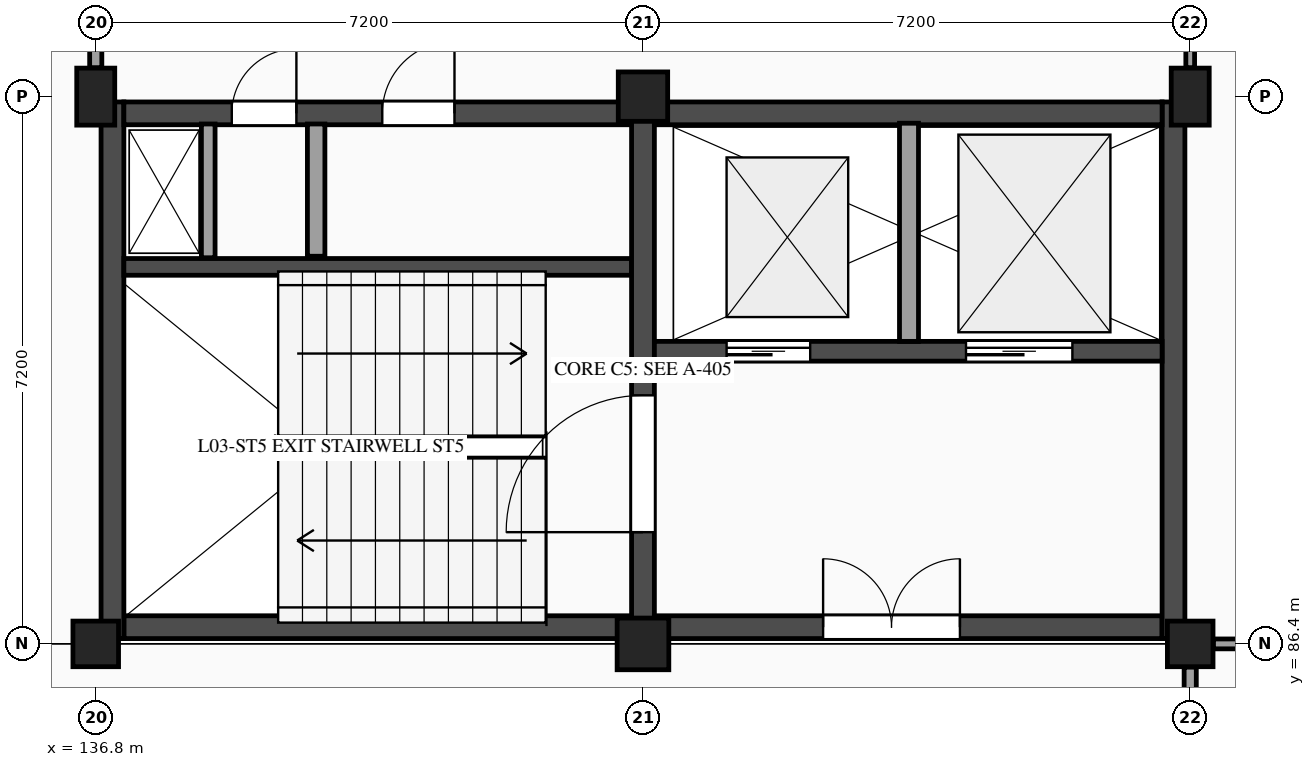
"""IFC4 building model, lengths in metres.
Left out: names, types, materials, properties, quantities, classifications, styles, units other than length and angle.
Written with IfcOpenShell. Run it as: python <this file> out.ifc"""

import sys

from ifc_helpers import new_model, si_unit, direction, frame, frame_2d, origin, origin_2d, place, context, subcontext, project, spatial, rectangle, extrude, element, fill, save


model = new_model("IFC4")
c1 = context("Model", 3, precision=1e-05, world=origin(), true_north=direction((0.0, 1.0)))
c2 = subcontext(c1, "Body", "Model", "MODEL_VIEW")
j1 = project(units=[si_unit("LENGTHUNIT", "METRE"), si_unit("PLANEANGLEUNIT", "RADIAN")], contexts=[c1])
p1 = place(None, origin())
s1 = spatial("IfcSite", under=j1, at=p1, CompositionType="ELEMENT")
p2 = place(p1, origin())
s2 = spatial("IfcBuilding", under=s1, at=p2, CompositionType="ELEMENT")
p3 = place(p2, frame((0.0, 0.0, 14.4)))
s3 = spatial("IfcBuildingStorey", under=s2, at=p3, CompositionType="ELEMENT", Elevation=14.4)
p4 = place(p3, frame((136.8, 86.4, 0.0), z_axis=(0.0, 0.0, 1.0), x_axis=(1.0, 0.0, 0.0)))
e1 = element("IfcColumn", 1, at=p4, inside=s3, PredefinedType="COLUMN", context=c2, shape_type="SweptSolid", body=[
    extrude(rectangle(XDim=0.6, YDim=0.6, at=origin_2d()), origin(), (0.0, 0.0, 1.0), 4.2),
])
p5 = place(p3, frame((136.8, 93.6, 0.0), z_axis=(0.0, 0.0, 1.0), x_axis=(1.0, 0.0, 0.0)))
e2 = element("IfcColumn", 2, at=p5, inside=s3, PredefinedType="COLUMN", context=c2, shape_type="SweptSolid", body=[
    extrude(rectangle(XDim=0.5, YDim=0.75, at=origin_2d()), origin(), (0.0, 0.0, 1.0), 4.2),
])
p6 = place(p3, frame((144.0, 86.4, 0.0), z_axis=(0.0, 0.0, 1.0), x_axis=(1.0, 0.0, 0.0)))
e3 = element("IfcColumn", 3, at=p6, inside=s3, PredefinedType="COLUMN", context=c2, shape_type="SweptSolid", body=[
    extrude(rectangle(XDim=0.68, YDim=0.68, at=origin_2d()), origin(), (0.0, 0.0, 1.0), 4.2),
])
p7 = place(p3, frame((144.0, 93.6, 0.0), z_axis=(0.0, 0.0, 1.0), x_axis=(1.0, 0.0, 0.0)))
e4 = element("IfcColumn", 4, at=p7, inside=s3, PredefinedType="COLUMN", context=c2, shape_type="SweptSolid", body=[
    extrude(rectangle(XDim=0.65, YDim=0.65, at=origin_2d()), origin(), (0.0, 0.0, 1.0), 4.2),
])
p8 = place(p3, frame((151.2, 86.4, 0.0), z_axis=(0.0, 0.0, 1.0), x_axis=(1.0, 0.0, 0.0)))
e5 = element("IfcColumn", 5, at=p8, inside=s3, PredefinedType="COLUMN", context=c2, shape_type="SweptSolid", body=[
    extrude(rectangle(XDim=0.6, YDim=0.6, at=origin_2d()), origin(), (0.0, 0.0, 1.0), 4.2),
])
p9 = place(p3, frame((151.2, 93.6, 0.0), z_axis=(0.0, 0.0, 1.0), x_axis=(1.0, 0.0, 0.0)))
e6 = element("IfcColumn", 6, at=p9, inside=s3, PredefinedType="COLUMN", context=c2, shape_type="SweptSolid", body=[
    extrude(rectangle(XDim=0.5, YDim=0.75, at=origin_2d()), origin(), (0.0, 0.0, 1.0), 4.2),
])
p10 = place(p3, frame((137.17, 86.62, 0.0), z_axis=(0.0, 0.0, 1.0), x_axis=(1.0, 0.0, 0.0)))
e7 = element("IfcWall", 7, at=p10, inside=s3, PredefinedType="SHEAR", context=c2, shape_type="SweptSolid", body=[
    extrude(rectangle(XDim=6.68, YDim=0.3, at=frame_2d((3.34, 0.0))), origin(), (0.0, 0.0, 1.0), 3.94),
])
p11 = place(p3, frame((137.02, 93.53, 0.0), z_axis=(0.0, 0.0, 1.0), x_axis=(0.0, -1.0, 0.0)))
e8 = element("IfcWall", 8, at=p11, inside=s3, PredefinedType="SHEAR", context=c2, shape_type="SweptSolid", body=[
    extrude(rectangle(XDim=7.06, YDim=0.3, at=frame_2d((3.53, 0.0))), origin(), (0.0, 0.0, 1.0), 3.94),
])
p12 = place(p3, frame((137.17, 93.38, 0.0), z_axis=(0.0, 0.0, 1.0), x_axis=(1.0, 0.0, 0.0)))
e9 = element("IfcWall", 9, at=p12, inside=s3, PredefinedType="SHEAR", context=c2, shape_type="SweptSolid", body=[
    extrude(rectangle(XDim=6.68, YDim=0.3, at=frame_2d((3.34, 0.0))), origin(), (0.0, 0.0, 1.0), 3.94),
])
p13 = place(p12, frame((1.42, 0.0, 0.0)))
e10 = element("IfcOpeningElement", 10, at=p13, cuts=e9, PredefinedType="OPENING", context=c2, shape_type="SweptSolid", body=[
    extrude(rectangle(XDim=0.85, YDim=2.1, at=frame_2d((0.425, 1.05))), frame((0.0, 0.16, 0.0), z_axis=(0.0, -1.0, 0.0), x_axis=(1.0, 0.0, 0.0)), (0.0, 0.0, 1.0), 0.32),
])
p14 = place(p12, frame((3.4, 0.0, 0.0)))
e11 = element("IfcOpeningElement", 11, at=p14, cuts=e9, PredefinedType="OPENING", context=c2, shape_type="SweptSolid", body=[
    extrude(rectangle(XDim=0.95, YDim=2.15, at=frame_2d((0.475, 1.075))), frame((0.0, 0.16, 0.0), z_axis=(0.0, -1.0, 0.0), x_axis=(1.0, 0.0, 0.0)), (0.0, 0.0, 1.0), 0.32),
])
p15 = place(p3, frame((137.17, 91.36, 0.0), z_axis=(0.0, 0.0, 1.0), x_axis=(1.0, 0.0, 0.0)))
e12 = element("IfcWall", 12, at=p15, inside=s3, PredefinedType="SHEAR", context=c2, shape_type="SweptSolid", body=[
    extrude(rectangle(XDim=6.68, YDim=0.22, at=frame_2d((3.34, 0.0))), origin(), (0.0, 0.0, 1.0), 3.94),
])
p16 = place(p3, frame((139.7, 91.5, 0.0), z_axis=(0.0, 0.0, 1.0), x_axis=(0.0, 1.0, 0.0)))
e13 = element("IfcWall", 13, at=p16, inside=s3, PredefinedType="PARTITIONING", context=c2, shape_type="SweptSolid", body=[
    extrude(rectangle(XDim=1.74, YDim=0.23, at=frame_2d((0.87, 0.0))), origin(), (0.0, 0.0, 1.0), 3.94),
])
p17 = place(p3, frame((138.28, 91.48, 0.0), z_axis=(0.0, 0.0, 1.0), x_axis=(0.0, 1.0, 0.0)))
e14 = element("IfcWall", 14, at=p17, inside=s3, PredefinedType="PARTITIONING", context=c2, shape_type="SweptSolid", body=[
    extrude(rectangle(XDim=1.76, YDim=0.18, at=frame_2d((0.88, 0.0))), origin(), (0.0, 0.0, 1.0), 3.94),
])
p18 = place(p3, frame((144.0, 86.47, 0.0), z_axis=(0.0, 0.0, 1.0), x_axis=(0.0, 1.0, 0.0)))
e15 = element("IfcWall", 15, at=p18, inside=s3, PredefinedType="SHEAR", context=c2, shape_type="SweptSolid", body=[
    extrude(rectangle(XDim=7.06, YDim=0.3, at=frame_2d((3.53, 0.0))), origin(), (0.0, 0.0, 1.0), 3.94),
])
p19 = place(p18, frame((1.4, 0.0, 0.0)))
e16 = element("IfcOpeningElement", 16, at=p19, cuts=e15, PredefinedType="OPENING", context=c2, shape_type="SweptSolid", body=[
    extrude(rectangle(XDim=1.8, YDim=2.2, at=frame_2d((0.9, 1.1))), frame((0.0, 0.16, 0.0), z_axis=(0.0, -1.0, 0.0), x_axis=(1.0, 0.0, 0.0)), (0.0, 0.0, 1.0), 0.32),
])
p20 = place(p3, frame((144.15, 86.62, 0.0), z_axis=(0.0, 0.0, 1.0), x_axis=(1.0, 0.0, 0.0)))
e17 = element("IfcWall", 17, at=p20, inside=s3, PredefinedType="SHEAR", context=c2, shape_type="SweptSolid", body=[
    extrude(rectangle(XDim=6.68, YDim=0.3, at=frame_2d((3.34, 0.0))), origin(), (0.0, 0.0, 1.0), 3.94),
])
p21 = place(p20, frame((2.22, 0.0, 0.0)))
e18 = element("IfcOpeningElement", 18, at=p21, cuts=e17, PredefinedType="OPENING", context=c2, shape_type="SweptSolid", body=[
    extrude(rectangle(XDim=1.8, YDim=2.2, at=frame_2d((0.9, 1.1))), frame((0.0, 0.16, 0.0), z_axis=(0.0, -1.0, 0.0), x_axis=(1.0, 0.0, 0.0)), (0.0, 0.0, 1.0), 0.32),
])
p22 = place(p3, frame((150.98, 86.47, 0.0), z_axis=(0.0, 0.0, 1.0), x_axis=(0.0, 1.0, 0.0)))
e19 = element("IfcWall", 19, at=p22, inside=s3, PredefinedType="SHEAR", context=c2, shape_type="SweptSolid", body=[
    extrude(rectangle(XDim=7.06, YDim=0.3, at=frame_2d((3.53, 0.0))), origin(), (0.0, 0.0, 1.0), 3.94),
])
p23 = place(p3, frame((144.15, 93.38, 0.0), z_axis=(0.0, 0.0, 1.0), x_axis=(1.0, 0.0, 0.0)))
e20 = element("IfcWall", 20, at=p23, inside=s3, PredefinedType="SHEAR", context=c2, shape_type="SweptSolid", body=[
    extrude(rectangle(XDim=6.68, YDim=0.3, at=frame_2d((3.34, 0.0))), origin(), (0.0, 0.0, 1.0), 3.94),
])
p24 = place(p3, frame((144.15, 90.25, 0.0), z_axis=(0.0, 0.0, 1.0), x_axis=(1.0, 0.0, 0.0)))
e21 = element("IfcWall", 21, at=p24, inside=s3, PredefinedType="SHEAR", context=c2, shape_type="SweptSolid", body=[
    extrude(rectangle(XDim=6.68, YDim=0.26, at=frame_2d((3.34, 0.0))), origin(), (0.0, 0.0, 1.0), 3.94),
])
p25 = place(p24, frame((0.95, 0.0, 0.0)))
e22 = element("IfcOpeningElement", 22, at=p25, cuts=e21, PredefinedType="OPENING", context=c2, shape_type="SweptSolid", body=[
    extrude(rectangle(XDim=1.1, YDim=2.2, at=frame_2d((0.55, 1.1))), frame((0.0, 0.14, 0.0), z_axis=(0.0, -1.0, 0.0), x_axis=(1.0, 0.0, 0.0)), (0.0, 0.0, 1.0), 0.28),
])
p26 = place(p24, frame((4.1, 0.0, 0.0)))
e23 = element("IfcOpeningElement", 23, at=p26, cuts=e21, PredefinedType="OPENING", context=c2, shape_type="SweptSolid", body=[
    extrude(rectangle(XDim=1.4, YDim=2.3, at=frame_2d((0.7, 1.15))), frame((0.0, 0.14, 0.0), z_axis=(0.0, -1.0, 0.0), x_axis=(1.0, 0.0, 0.0)), (0.0, 0.0, 1.0), 0.28),
])
p27 = place(p3, frame((147.5, 90.38, 0.0), z_axis=(0.0, 0.0, 1.0), x_axis=(0.0, 1.0, 0.0)))
e24 = element("IfcWall", 24, at=p27, inside=s3, PredefinedType="PARTITIONING", context=c2, shape_type="SweptSolid", body=[
    extrude(rectangle(XDim=2.87, YDim=0.25, at=frame_2d((1.435, 0.0))), origin(), (0.0, 0.0, 1.0), 3.94),
])
p28 = place(p3, frame((136.8, 93.98, 0.0), z_axis=(0.0, 0.0, 1.0), x_axis=(0.0, 1.0, 0.0)))
e25 = element("IfcWall", 25, at=p28, inside=s3, PredefinedType="PARTITIONING", context=c2, shape_type="SweptSolid", body=[
    extrude(rectangle(XDim=6.495, YDim=0.16, at=frame_2d((3.248, 0.0))), origin(), (0.0, 0.0, 1.0), 3.23),
])
p29 = place(p28, frame((2.558, 0.0, 0.0)))
e26 = element("IfcOpeningElement", 26, at=p29, cuts=e25, PredefinedType="OPENING", context=c2, shape_type="SweptSolid", body=[
    extrude(rectangle(XDim=1.38, YDim=2.22, at=frame_2d((0.69, 1.11))), frame((0.0, 0.09, 0.0), z_axis=(0.0, -1.0, 0.0), x_axis=(1.0, 0.0, 0.0)), (0.0, 0.0, 1.0), 0.18),
])
p30 = place(p3, frame((151.2, 79.515, 0.0), z_axis=(0.0, 0.0, 1.0), x_axis=(0.0, 1.0, 0.0)))
e27 = element("IfcWall", 27, at=p30, inside=s3, PredefinedType="PARTITIONING", context=c2, shape_type="SweptSolid", body=[
    extrude(rectangle(XDim=6.58, YDim=0.16, at=frame_2d((3.29, 0.0))), origin(), (0.0, 0.0, 1.0), 3.305),
])
p31 = place(p3, frame((151.2, 93.98, 0.0), z_axis=(0.0, 0.0, 1.0), x_axis=(0.0, 1.0, 0.0)))
e28 = element("IfcWall", 28, at=p31, inside=s3, PredefinedType="PARTITIONING", context=c2, shape_type="SweptSolid", body=[
    extrude(rectangle(XDim=6.495, YDim=0.115, at=frame_2d((3.248, 0.0))), origin(), (0.0, 0.0, 1.0), 3.255),
])
p32 = place(p3, frame((151.505, 86.4, 0.0), z_axis=(0.0, 0.0, 1.0), x_axis=(1.0, 0.0, 0.0)))
e29 = element("IfcWall", 29, at=p32, inside=s3, PredefinedType="PARTITIONING", context=c2, shape_type="SweptSolid", body=[
    extrude(rectangle(XDim=6.55, YDim=0.13, at=frame_2d((3.275, 0.0))), origin(), (0.0, 0.0, 1.0), 3.22),
])
p33 = place(p32, frame((2.395, 0.0, 0.0)))
e30 = element("IfcOpeningElement", 30, at=p33, cuts=e29, PredefinedType="OPENING", context=c2, shape_type="SweptSolid", body=[
    extrude(rectangle(XDim=1.76, YDim=2.3, at=frame_2d((0.88, 1.15))), frame((0.0, 0.075, 0.0), z_axis=(0.0, -1.0, 0.0), x_axis=(1.0, 0.0, 0.0)), (0.0, 0.0, 1.0), 0.15),
])
p34 = place(p13, origin())
e31 = element("IfcDoor", 31, at=p34, inside=s3, OperationType="SINGLE_SWING_RIGHT", PredefinedType="DOOR", context=c2, shape_type="SweptSolid", body=[
    extrude(rectangle(XDim=0.85, YDim=2.1, at=frame_2d((0.425, 1.05))), frame((0.0, 0.025, 0.0), z_axis=(0.0, -1.0, 0.0), x_axis=(1.0, 0.0, 0.0)), (0.0, 0.0, 1.0), 0.05),
])
fill(e10, e31)
p35 = place(p19, origin())
e32 = element("IfcDoor", 32, at=p35, inside=s3, OperationType="SINGLE_SWING_LEFT", PredefinedType="DOOR", context=c2, shape_type="SweptSolid", body=[
    extrude(rectangle(XDim=1.8, YDim=2.2, at=frame_2d((0.9, 1.1))), frame((0.0, 0.025, 0.0), z_axis=(0.0, -1.0, 0.0), x_axis=(1.0, 0.0, 0.0)), (0.0, 0.0, 1.0), 0.05),
])
fill(e16, e32)
p36 = place(p14, origin())
e33 = element("IfcDoor", 33, at=p36, inside=s3, OperationType="SINGLE_SWING_RIGHT", PredefinedType="DOOR", context=c2, shape_type="SweptSolid", body=[
    extrude(rectangle(XDim=0.95, YDim=2.15, at=frame_2d((0.475, 1.075))), frame((0.0, 0.025, 0.0), z_axis=(0.0, -1.0, 0.0), x_axis=(1.0, 0.0, 0.0)), (0.0, 0.0, 1.0), 0.05),
])
fill(e11, e33)
p37 = place(p25, origin())
e34 = element("IfcDoor", 34, at=p37, inside=s3, OperationType="SLIDING_TO_LEFT", PredefinedType="DOOR", context=c2, shape_type="SweptSolid", body=[
    extrude(rectangle(XDim=1.1, YDim=2.2, at=frame_2d((0.55, 1.1))), frame((0.0, 0.025, 0.0), z_axis=(0.0, -1.0, 0.0), x_axis=(1.0, 0.0, 0.0)), (0.0, 0.0, 1.0), 0.05),
])
fill(e22, e34)
p38 = place(p26, origin())
e35 = element("IfcDoor", 35, at=p38, inside=s3, OperationType="SLIDING_TO_RIGHT", PredefinedType="DOOR", context=c2, shape_type="SweptSolid", body=[
    extrude(rectangle(XDim=1.4, YDim=2.3, at=frame_2d((0.7, 1.15))), frame((0.0, 0.025, 0.0), z_axis=(0.0, -1.0, 0.0), x_axis=(1.0, 0.0, 0.0)), (0.0, 0.0, 1.0), 0.05),
])
fill(e23, e35)
p39 = place(p21, origin())
e36 = element("IfcDoor", 36, at=p39, inside=s3, OperationType="DOUBLE_DOOR_SINGLE_SWING", PredefinedType="DOOR", context=c2, shape_type="SweptSolid", body=[
    extrude(rectangle(XDim=1.8, YDim=2.2, at=frame_2d((0.9, 1.1))), frame((0.0, 0.025, 0.0), z_axis=(0.0, -1.0, 0.0), x_axis=(1.0, 0.0, 0.0)), (0.0, 0.0, 1.0), 0.05),
])
fill(e18, e36)
save(model, sys.argv[1])
